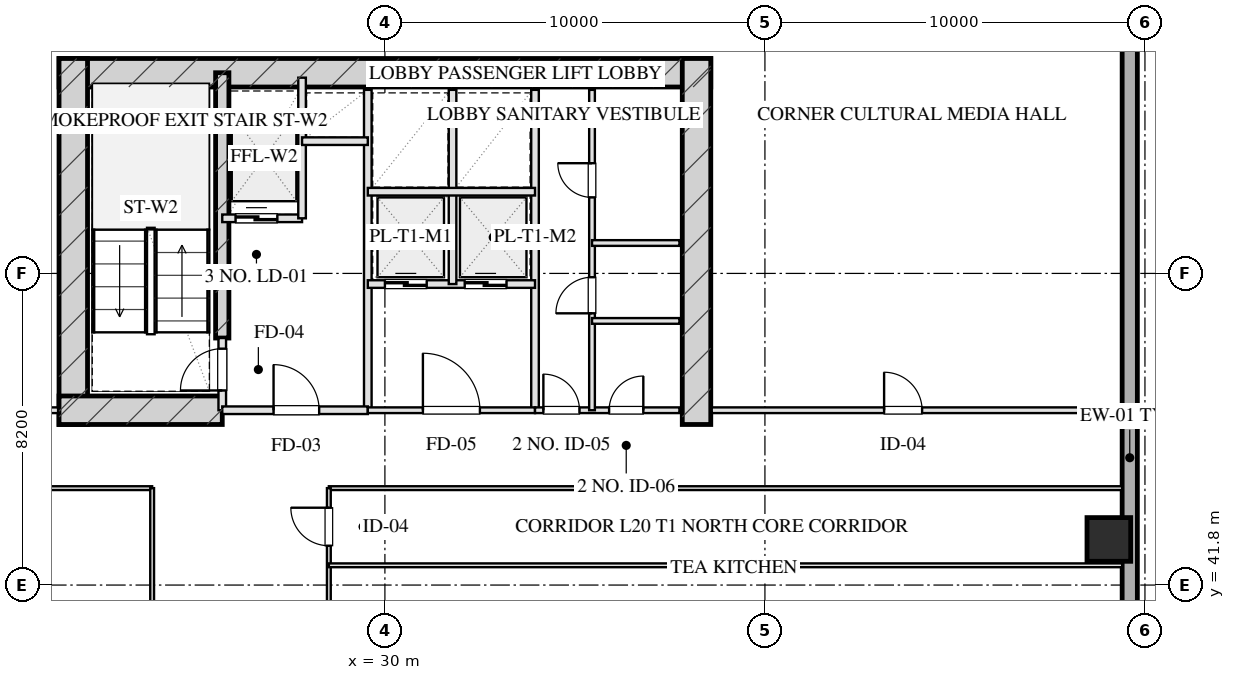
"""IFC4 building model, lengths in metres.
Left out: names, types, materials, properties, quantities, classifications, styles, units other than length and angle.
Written with IfcOpenShell. Run it as: python <this file> out.ifc"""

import sys

from ifc_helpers import new_model, si_unit, direction, frame, frame_2d, origin, origin_2d, place, context, subcontext, project, spatial, rectangle, hollow_rectangle, extrude, element, fill, save


model = new_model("IFC4")
c1 = context("Model", 3, precision=1e-05, world=origin(), true_north=direction((0.0, 1.0)))
c2 = subcontext(c1, "Body", "Model", "MODEL_VIEW")
j1 = project(units=[si_unit("LENGTHUNIT", "METRE"), si_unit("PLANEANGLEUNIT", "RADIAN")], contexts=[c1])
p1 = place(None, origin())
s1 = spatial("IfcSite", under=j1, at=p1, CompositionType="ELEMENT")
p2 = place(p1, origin())
s2 = spatial("IfcBuilding", under=s1, at=p2, CompositionType="ELEMENT")
p3 = place(p2, frame((0.0, 0.0, 81.65)))
s3 = spatial("IfcBuildingStorey", under=s2, at=p3, CompositionType="ELEMENT", Elevation=81.65)
p4 = place(p3, frame((21.425, 55.28, 0.0), z_axis=(0.0, 0.0, 1.0), x_axis=(1.0, 0.0, 0.0)))
e1 = element("IfcWall", 1, at=p4, inside=s3, PredefinedType="SHEAR", context=c2, shape_type="SweptSolid", body=[
    extrude(rectangle(XDim=17.15, YDim=0.75, at=frame_2d((8.575, 0.0))), origin(), (0.0, 0.0, 1.0), 3.45),
])
for number, where, z_axis, x_axis in (
    (2, (21.8, 46.025, 0.0), (0.0, 0.0, 1.0), (0.0, 1.0, 0.0)),
    (3, (38.2, 46.025, 0.0), (0.0, 0.0, 1.0), (0.0, 1.0, 0.0)),
):
    element("IfcWall", number, at=place(p3, frame(where, z_axis=z_axis, x_axis=x_axis)), inside=s3, PredefinedType="SHEAR", context=c2, shape_type="SweptSolid", body=[
        extrude(rectangle(XDim=9.63, YDim=0.75, at=frame_2d((4.815, 0.0))), origin(), (0.0, 0.0, 1.0), 3.45),
    ])
p5 = place(p3, frame((25.72, 48.3, 0.0), z_axis=(0.0, 0.0, 1.0), x_axis=(0.0, 1.0, 0.0)))
e4 = element("IfcWall", 4, at=p5, inside=s3, PredefinedType="SHEAR", context=c2, shape_type="SweptSolid", body=[
    extrude(rectangle(XDim=6.98, YDim=0.35, at=frame_2d((3.49, 0.0))), origin(), (0.0, 0.0, 1.0), 3.45),
])
p6 = place(p3, frame((21.425, 46.4, 0.0), z_axis=(0.0, 0.0, 1.0), x_axis=(1.0, 0.0, 0.0)))
e5 = element("IfcWall", 5, at=p6, inside=s3, PredefinedType="SHEAR", context=c2, shape_type="SweptSolid", body=[
    extrude(rectangle(XDim=4.295, YDim=0.75, at=frame_2d((2.147, 0.0))), origin(), (0.0, 0.0, 1.0), 3.45),
])
p7 = place(p3, frame((49.05, 43.0, 0.0), z_axis=(0.0, 0.0, 1.0), x_axis=(1.0, 0.0, 0.0)))
e6 = element("IfcColumn", 6, at=p7, inside=s3, PredefinedType="COLUMN", context=c2, shape_type="SweptSolid", body=[
    extrude(hollow_rectangle(XDim=1.15, YDim=1.15, WallThickness=0.04, at=origin_2d()), origin(), (0.0, 0.0, 1.0), 3.451),
])
p8 = place(p3, frame((49.6, 60.8, 0.0), z_axis=(0.0, 0.0, 1.0), x_axis=(0.0, -1.0, 0.0)))
e7 = element("IfcWall", 7, at=p8, inside=s3, PredefinedType="SOLIDWALL", context=c2, shape_type="SweptSolid", body=[
    extrude(rectangle(XDim=53.6, YDim=0.4, at=frame_2d((26.8, 0.0))), origin(), (0.0, 0.0, 1.0), 2.61),
])
p9 = place(p8, frame((32.05, 0.0, 0.0)))
e8 = element("IfcOpeningElement", 8, at=p9, cuts=e7, PredefinedType="OPENING", context=c2, shape_type="SweptSolid", body=[
    extrude(rectangle(XDim=1.1, YDim=2.15, at=frame_2d((0.55, 1.075))), frame((0.0, 0.21, 0.0), z_axis=(0.0, -1.0, 0.0), x_axis=(1.0, 0.0, 0.0)), (0.0, 0.0, 1.0), 0.42),
])
p10 = place(p3, frame((25.72, 46.4, 0.0), z_axis=(0.0, 0.0, 1.0), x_axis=(0.0, 1.0, 0.0)))
e9 = element("IfcWall", 9, at=p10, inside=s3, PredefinedType="PARTITIONING", context=c2, shape_type="SweptSolid", body=[
    extrude(rectangle(XDim=1.9, YDim=0.2, at=frame_2d((0.95, 0.0))), origin(), (0.0, 0.0, 1.0), 3.175),
])
p11 = place(p10, frame((0.52, 0.0, 0.0)))
e10 = element("IfcOpeningElement", 10, at=p11, cuts=e9, PredefinedType="OPENING", context=c2, shape_type="SweptSolid", body=[
    extrude(rectangle(XDim=1.1, YDim=2.05, at=frame_2d((0.55, 1.025))), frame((0.0, 0.11, 0.0), z_axis=(0.0, -1.0, 0.0), x_axis=(1.0, 0.0, 0.0)), (0.0, 0.0, 1.0), 0.22),
])
p12 = place(p3, frame((29.55, 46.4, 0.0), z_axis=(0.0, 0.0, 1.0), x_axis=(0.0, 1.0, 0.0)))
e11 = element("IfcWall", 11, at=p12, inside=s3, PredefinedType="PARTITIONING", context=c2, shape_type="SweptSolid", body=[
    extrude(rectangle(XDim=8.43, YDim=0.2, at=frame_2d((4.215, 0.0))), origin(), (0.0, 0.0, 1.0), 3.175),
])
p13 = place(p3, frame((25.72, 46.4, 0.0), z_axis=(0.0, 0.0, 1.0), x_axis=(1.0, 0.0, 0.0)))
e12 = element("IfcWall", 12, at=p13, inside=s3, PredefinedType="PARTITIONING", context=c2, shape_type="SweptSolid", body=[
    extrude(rectangle(XDim=3.83, YDim=0.2, at=frame_2d((1.915, 0.0))), origin(), (0.0, 0.0, 1.0), 3.175),
])
p14 = place(p13, frame((1.35, 0.0, 0.0)))
e13 = element("IfcOpeningElement", 13, at=p14, cuts=e12, PredefinedType="OPENING", context=c2, shape_type="SweptSolid", body=[
    extrude(rectangle(XDim=1.2, YDim=2.05, at=frame_2d((0.6, 1.025))), frame((0.0, 0.11, 0.0), z_axis=(0.0, -1.0, 0.0), x_axis=(1.0, 0.0, 0.0)), (0.0, 0.0, 1.0), 0.22),
])
p15 = place(p3, frame((25.72, 51.45, 0.0), z_axis=(0.0, 0.0, 1.0), x_axis=(1.0, 0.0, 0.0)))
e14 = element("IfcWall", 14, at=p15, inside=s3, PredefinedType="PARTITIONING", context=c2, shape_type="SweptSolid", body=[
    extrude(rectangle(XDim=2.1, YDim=0.2, at=frame_2d((1.05, 0.0))), origin(), (0.0, 0.0, 1.0), 3.175),
])
p16 = place(p15, frame((0.35, 0.0, 0.0)))
e15 = element("IfcOpeningElement", 15, at=p16, cuts=e14, PredefinedType="OPENING", context=c2, shape_type="SweptSolid", body=[
    extrude(rectangle(XDim=1.1, YDim=2.05, at=frame_2d((0.55, 1.025))), frame((0.0, 0.11, 0.0), z_axis=(0.0, -1.0, 0.0), x_axis=(1.0, 0.0, 0.0)), (0.0, 0.0, 1.0), 0.22),
])
p17 = place(p3, frame((27.82, 51.45, 0.0), z_axis=(0.0, 0.0, 1.0), x_axis=(0.0, 1.0, 0.0)))
e16 = element("IfcWall", 16, at=p17, inside=s3, PredefinedType="PARTITIONING", context=c2, shape_type="SweptSolid", body=[
    extrude(rectangle(XDim=3.7, YDim=0.2, at=frame_2d((1.85, 0.0))), origin(), (0.0, 0.0, 1.0), 3.175),
])
p18 = place(p3, frame((27.82, 53.48, 0.0), z_axis=(0.0, 0.0, 1.0), x_axis=(1.0, 0.0, 0.0)))
e17 = element("IfcWall", 17, at=p18, inside=s3, PredefinedType="PARTITIONING", context=c2, shape_type="SweptSolid", body=[
    extrude(rectangle(XDim=1.73, YDim=0.2, at=frame_2d((0.865, 0.0))), origin(), (0.0, 0.0, 1.0), 3.175),
])
p19 = place(p3, frame((33.95, 46.4, 0.0), z_axis=(0.0, 0.0, 1.0), x_axis=(0.0, 1.0, 0.0)))
e18 = element("IfcWall", 18, at=p19, inside=s3, PredefinedType="PARTITIONING", context=c2, shape_type="SweptSolid", body=[
    extrude(rectangle(XDim=8.43, YDim=0.2, at=frame_2d((4.215, 0.0))), origin(), (0.0, 0.0, 1.0), 3.175),
])
p20 = place(p3, frame((29.55, 46.4, 0.0), z_axis=(0.0, 0.0, 1.0), x_axis=(1.0, 0.0, 0.0)))
e19 = element("IfcWall", 19, at=p20, inside=s3, PredefinedType="PARTITIONING", context=c2, shape_type="SweptSolid", body=[
    extrude(rectangle(XDim=4.4, YDim=0.15, at=frame_2d((2.2, 0.0))), origin(), (0.0, 0.0, 1.0), 3.175),
])
p21 = place(p20, frame((1.45, 0.0, 0.0)))
e20 = element("IfcOpeningElement", 20, at=p21, cuts=e19, PredefinedType="OPENING", context=c2, shape_type="SweptSolid", body=[
    extrude(rectangle(XDim=1.5, YDim=2.05, at=frame_2d((0.75, 1.025))), frame((0.0, 0.085, 0.0), z_axis=(0.0, -1.0, 0.0), x_axis=(1.0, 0.0, 0.0)), (0.0, 0.0, 1.0), 0.17),
])
p22 = place(p3, frame((29.55, 49.72, 0.0), z_axis=(0.0, 0.0, 1.0), x_axis=(1.0, 0.0, 0.0)))
e21 = element("IfcWall", 21, at=p22, inside=s3, PredefinedType="PARTITIONING", context=c2, shape_type="SweptSolid", body=[
    extrude(rectangle(XDim=4.4, YDim=0.2, at=frame_2d((2.2, 0.0))), origin(), (0.0, 0.0, 1.0), 3.175),
])
p23 = place(p22, frame((0.45, 0.0, 0.0)))
e22 = element("IfcOpeningElement", 22, at=p23, cuts=e21, PredefinedType="OPENING", context=c2, shape_type="SweptSolid", body=[
    extrude(rectangle(XDim=1.1, YDim=2.05, at=frame_2d((0.55, 1.025))), frame((0.0, 0.11, 0.0), z_axis=(0.0, -1.0, 0.0), x_axis=(1.0, 0.0, 0.0)), (0.0, 0.0, 1.0), 0.22),
])
p24 = place(p22, frame((2.55, 0.0, 0.0)))
e23 = element("IfcOpeningElement", 23, at=p24, cuts=e21, PredefinedType="OPENING", context=c2, shape_type="SweptSolid", body=[
    extrude(rectangle(XDim=1.1, YDim=2.05, at=frame_2d((0.55, 1.025))), frame((0.0, 0.11, 0.0), z_axis=(0.0, -1.0, 0.0), x_axis=(1.0, 0.0, 0.0)), (0.0, 0.0, 1.0), 0.22),
])
p25 = place(p3, frame((31.78, 49.72, 0.0), z_axis=(0.0, 0.0, 1.0), x_axis=(0.0, 1.0, 0.0)))
e24 = element("IfcWall", 24, at=p25, inside=s3, PredefinedType="PARTITIONING", context=c2, shape_type="SweptSolid", body=[
    extrude(rectangle(XDim=5.11, YDim=0.2, at=frame_2d((2.555, 0.0))), origin(), (0.0, 0.0, 1.0), 3.175),
])
p26 = place(p3, frame((29.55, 52.15, 0.0), z_axis=(0.0, 0.0, 1.0), x_axis=(1.0, 0.0, 0.0)))
e25 = element("IfcWall", 25, at=p26, inside=s3, PredefinedType="PARTITIONING", context=c2, shape_type="SweptSolid", body=[
    extrude(rectangle(XDim=4.4, YDim=0.2, at=frame_2d((2.2, 0.0))), origin(), (0.0, 0.0, 1.0), 3.175),
])
p27 = place(p3, frame((33.95, 46.4, 0.0), z_axis=(0.0, 0.0, 1.0), x_axis=(1.0, 0.0, 0.0)))
e26 = element("IfcWall", 26, at=p27, inside=s3, PredefinedType="PARTITIONING", context=c2, shape_type="SweptSolid", body=[
    extrude(rectangle(XDim=3.8, YDim=0.15, at=frame_2d((1.9, 0.0))), origin(), (0.0, 0.0, 1.0), 3.175),
])
p28 = place(p27, frame((0.22, 0.0, 0.0)))
e27 = element("IfcOpeningElement", 27, at=p28, cuts=e26, PredefinedType="OPENING", context=c2, shape_type="SweptSolid", body=[
    extrude(rectangle(XDim=0.95, YDim=2.05, at=frame_2d((0.475, 1.025))), frame((0.0, 0.085, 0.0), z_axis=(0.0, -1.0, 0.0), x_axis=(1.0, 0.0, 0.0)), (0.0, 0.0, 1.0), 0.17),
])
p29 = place(p27, frame((1.95, 0.0, 0.0)))
e28 = element("IfcOpeningElement", 28, at=p29, cuts=e26, PredefinedType="OPENING", context=c2, shape_type="SweptSolid", body=[
    extrude(rectangle(XDim=0.9, YDim=2.05, at=frame_2d((0.45, 1.025))), frame((0.0, 0.085, 0.0), z_axis=(0.0, -1.0, 0.0), x_axis=(1.0, 0.0, 0.0)), (0.0, 0.0, 1.0), 0.17),
])
p30 = place(p3, frame((35.45, 46.4, 0.0), z_axis=(0.0, 0.0, 1.0), x_axis=(0.0, 1.0, 0.0)))
e29 = element("IfcWall", 29, at=p30, inside=s3, PredefinedType="PARTITIONING", context=c2, shape_type="SweptSolid", body=[
    extrude(rectangle(XDim=8.43, YDim=0.15, at=frame_2d((4.215, 0.0))), origin(), (0.0, 0.0, 1.0), 2.765),
])
p31 = place(p30, frame((2.55, 0.0, 0.0)))
e30 = element("IfcOpeningElement", 30, at=p31, cuts=e29, PredefinedType="OPENING", context=c2, shape_type="SweptSolid", body=[
    extrude(rectangle(XDim=0.95, YDim=2.05, at=frame_2d((0.475, 1.025))), frame((0.0, 0.085, 0.0), z_axis=(0.0, -1.0, 0.0), x_axis=(1.0, 0.0, 0.0)), (0.0, 0.0, 1.0), 0.17),
])
p32 = place(p30, frame((5.6, 0.0, 0.0)))
e31 = element("IfcOpeningElement", 31, at=p32, cuts=e29, PredefinedType="OPENING", context=c2, shape_type="SweptSolid", body=[
    extrude(rectangle(XDim=0.9, YDim=2.05, at=frame_2d((0.45, 1.025))), frame((0.0, 0.085, 0.0), z_axis=(0.0, -1.0, 0.0), x_axis=(1.0, 0.0, 0.0)), (0.0, 0.0, 1.0), 0.17),
])
for number, where, z_axis, x_axis in (
    (32, (35.45, 50.8, 0.0), (0.0, 0.0, 1.0), (1.0, 0.0, 0.0)),
    (33, (35.45, 48.75, 0.0), (0.0, 0.0, 1.0), (1.0, 0.0, 0.0)),
):
    element("IfcWall", number, at=place(p3, frame(where, z_axis=z_axis, x_axis=x_axis)), inside=s3, PredefinedType="PARTITIONING", context=c2, shape_type="SweptSolid", body=[
        extrude(rectangle(XDim=2.3, YDim=0.15, at=frame_2d((1.15, 0.0))), origin(), (0.0, 0.0, 1.0), 3.175),
    ])
p33 = place(p3, frame((10.6, 46.4, 0.0), z_axis=(0.0, 0.0, 1.0), x_axis=(1.0, 0.0, 0.0)))
e34 = element("IfcWall", 34, at=p33, inside=s3, PredefinedType="PARTITIONING", context=c2, shape_type="SweptSolid", body=[
    extrude(rectangle(XDim=10.8, YDim=0.15, at=frame_2d((5.4, 0.0))), origin(), (0.0, 0.0, 1.0), 3.175),
])
p34 = place(p33, frame((4.536, 0.0, 0.0)))
e35 = element("IfcOpeningElement", 35, at=p34, cuts=e34, PredefinedType="OPENING", context=c2, shape_type="SweptSolid", body=[
    extrude(rectangle(XDim=1.0, YDim=2.05, at=frame_2d((0.5, 1.025))), frame((0.0, 0.085, 0.0), z_axis=(0.0, -1.0, 0.0), x_axis=(1.0, 0.0, 0.0)), (0.0, 0.0, 1.0), 0.17),
])
p35 = place(p3, frame((38.6, 46.4, 0.0), z_axis=(0.0, 0.0, 1.0), x_axis=(1.0, 0.0, 0.0)))
e36 = element("IfcWall", 36, at=p35, inside=s3, PredefinedType="PARTITIONING", context=c2, shape_type="SweptSolid", body=[
    extrude(rectangle(XDim=10.8, YDim=0.15, at=frame_2d((5.4, 0.0))), origin(), (0.0, 0.0, 1.0), 3.175),
])
p36 = place(p35, frame((4.536, 0.0, 0.0)))
e37 = element("IfcOpeningElement", 37, at=p36, cuts=e36, PredefinedType="OPENING", context=c2, shape_type="SweptSolid", body=[
    extrude(rectangle(XDim=1.0, YDim=2.05, at=frame_2d((0.5, 1.025))), frame((0.0, 0.085, 0.0), z_axis=(0.0, -1.0, 0.0), x_axis=(1.0, 0.0, 0.0)), (0.0, 0.0, 1.0), 0.17),
])
p37 = place(p3, frame((10.6, 44.35, 0.0), z_axis=(0.0, 0.0, 1.0), x_axis=(1.0, 0.0, 0.0)))
e38 = element("IfcWall", 38, at=p37, inside=s3, PredefinedType="MOVABLE", context=c2, shape_type="SweptSolid", body=[
    extrude(rectangle(XDim=13.275, YDim=0.1, at=frame_2d((6.637, 0.0))), origin(), (0.0, 0.0, 1.0), 3.175),
])
p38 = place(p3, frame((28.525, 44.35, 0.0), z_axis=(0.0, 0.0, 1.0), x_axis=(1.0, 0.0, 0.0)))
e39 = element("IfcWall", 39, at=p38, inside=s3, PredefinedType="MOVABLE", context=c2, shape_type="SweptSolid", body=[
    extrude(rectangle(XDim=20.875, YDim=0.1, at=frame_2d((10.438, 0.0))), origin(), (0.0, 0.0, 1.0), 3.175),
])
p39 = place(p3, frame((23.875, 23.65, 0.0), z_axis=(0.0, 0.0, 1.0), x_axis=(0.0, 1.0, 0.0)))
e40 = element("IfcWall", 40, at=p39, inside=s3, PredefinedType="MOVABLE", context=c2, shape_type="SweptSolid", body=[
    extrude(rectangle(XDim=20.7, YDim=0.1, at=frame_2d((10.35, 0.0))), origin(), (0.0, 0.0, 1.0), 3.175),
])
p40 = place(p39, frame((4.075, 0.0, 0.0)))
e41 = element("IfcOpeningElement", 41, at=p40, cuts=e40, PredefinedType="OPENING", context=c2, shape_type="SweptSolid", body=[
    extrude(rectangle(XDim=1.0, YDim=2.05, at=frame_2d((0.5, 1.025))), frame((0.0, 0.06, 0.0), z_axis=(0.0, -1.0, 0.0), x_axis=(1.0, 0.0, 0.0)), (0.0, 0.0, 1.0), 0.12),
])
p41 = place(p39, frame((14.425, 0.0, 0.0)))
e42 = element("IfcOpeningElement", 42, at=p41, cuts=e40, PredefinedType="OPENING", context=c2, shape_type="SweptSolid", body=[
    extrude(rectangle(XDim=1.0, YDim=2.05, at=frame_2d((0.5, 1.025))), frame((0.0, 0.06, 0.0), z_axis=(0.0, -1.0, 0.0), x_axis=(1.0, 0.0, 0.0)), (0.0, 0.0, 1.0), 0.12),
])
p42 = place(p3, frame((28.525, 23.65, 0.0), z_axis=(0.0, 0.0, 1.0), x_axis=(0.0, 1.0, 0.0)))
e43 = element("IfcWall", 43, at=p42, inside=s3, PredefinedType="MOVABLE", context=c2, shape_type="SweptSolid", body=[
    extrude(rectangle(XDim=20.7, YDim=0.1, at=frame_2d((10.35, 0.0))), origin(), (0.0, 0.0, 1.0), 3.175),
])
p43 = place(p42, frame((0.775, 0.0, 0.0)))
e44 = element("IfcOpeningElement", 44, at=p43, cuts=e43, PredefinedType="OPENING", context=c2, shape_type="SweptSolid", body=[
    extrude(rectangle(XDim=1.0, YDim=2.05, at=frame_2d((0.5, 1.025))), frame((0.0, 0.06, 0.0), z_axis=(0.0, -1.0, 0.0), x_axis=(1.0, 0.0, 0.0)), (0.0, 0.0, 1.0), 0.12),
])
p44 = place(p42, frame((3.95, 0.0, 0.0)))
e45 = element("IfcOpeningElement", 45, at=p44, cuts=e43, PredefinedType="OPENING", context=c2, shape_type="SweptSolid", body=[
    extrude(rectangle(XDim=1.0, YDim=2.05, at=frame_2d((0.5, 1.025))), frame((0.0, 0.06, 0.0), z_axis=(0.0, -1.0, 0.0), x_axis=(1.0, 0.0, 0.0)), (0.0, 0.0, 1.0), 0.12),
])
p45 = place(p42, frame((7.51, 0.0, 0.0)))
e46 = element("IfcOpeningElement", 46, at=p45, cuts=e43, PredefinedType="OPENING", context=c2, shape_type="SweptSolid", body=[
    extrude(rectangle(XDim=1.05, YDim=2.05, at=frame_2d((0.525, 1.025))), frame((0.0, 0.06, 0.0), z_axis=(0.0, -1.0, 0.0), x_axis=(1.0, 0.0, 0.0)), (0.0, 0.0, 1.0), 0.12),
])
p46 = place(p42, frame((11.51, 0.0, 0.0)))
e47 = element("IfcOpeningElement", 47, at=p46, cuts=e43, PredefinedType="OPENING", context=c2, shape_type="SweptSolid", body=[
    extrude(rectangle(XDim=1.0, YDim=2.05, at=frame_2d((0.5, 1.025))), frame((0.0, 0.06, 0.0), z_axis=(0.0, -1.0, 0.0), x_axis=(1.0, 0.0, 0.0)), (0.0, 0.0, 1.0), 0.12),
])
p47 = place(p42, frame((15.75, 0.0, 0.0)))
e48 = element("IfcOpeningElement", 48, at=p47, cuts=e43, PredefinedType="OPENING", context=c2, shape_type="SweptSolid", body=[
    extrude(rectangle(XDim=1.0, YDim=2.05, at=frame_2d((0.5, 1.025))), frame((0.0, 0.06, 0.0), z_axis=(0.0, -1.0, 0.0), x_axis=(1.0, 0.0, 0.0)), (0.0, 0.0, 1.0), 0.12),
])
p48 = place(p42, frame((19.185, 0.0, 0.0)))
e49 = element("IfcOpeningElement", 49, at=p48, cuts=e43, PredefinedType="OPENING", context=c2, shape_type="SweptSolid", body=[
    extrude(rectangle(XDim=1.0, YDim=2.05, at=frame_2d((0.5, 1.025))), frame((0.0, 0.06, 0.0), z_axis=(0.0, -1.0, 0.0), x_axis=(1.0, 0.0, 0.0)), (0.0, 0.0, 1.0), 0.12),
])
p49 = place(p3, frame((28.525, 42.32, 0.0), z_axis=(0.0, 0.0, 1.0), x_axis=(1.0, 0.0, 0.0)))
e50 = element("IfcWall", 50, at=p49, inside=s3, PredefinedType="MOVABLE", context=c2, shape_type="SweptSolid", body=[
    extrude(rectangle(XDim=20.875, YDim=0.1, at=frame_2d((10.438, 0.0))), origin(), (0.0, 0.0, 1.0), 3.175),
])
p50 = place(p11, origin())
e51 = element("IfcDoor", 51, at=p50, inside=s3, OperationType="SINGLE_SWING_LEFT", PredefinedType="DOOR", context=c2, shape_type="SweptSolid", body=[
    extrude(rectangle(XDim=1.1, YDim=2.05, at=frame_2d((0.55, 1.025))), frame((0.0, 0.025, 0.0), z_axis=(0.0, -1.0, 0.0), x_axis=(1.0, 0.0, 0.0)), (0.0, 0.0, 1.0), 0.05),
])
fill(e10, e51)
p51 = place(p14, origin())
e52 = element("IfcDoor", 52, at=p51, inside=s3, OperationType="SINGLE_SWING_LEFT", PredefinedType="DOOR", context=c2, shape_type="SweptSolid", body=[
    extrude(rectangle(XDim=1.2, YDim=2.05, at=frame_2d((0.6, 1.025))), frame((0.0, 0.025, 0.0), z_axis=(0.0, -1.0, 0.0), x_axis=(1.0, 0.0, 0.0)), (0.0, 0.0, 1.0), 0.05),
])
fill(e13, e52)
p52 = place(p16, origin())
e53 = element("IfcDoor", 53, at=p52, inside=s3, OperationType="DOUBLE_DOOR_SLIDING", PredefinedType="DOOR", context=c2, shape_type="SweptSolid", body=[
    extrude(rectangle(XDim=1.1, YDim=2.05, at=frame_2d((0.55, 1.025))), frame((0.0, 0.025, 0.0), z_axis=(0.0, -1.0, 0.0), x_axis=(1.0, 0.0, 0.0)), (0.0, 0.0, 1.0), 0.05),
])
fill(e15, e53)
p53 = place(p21, origin())
e54 = element("IfcDoor", 54, at=p53, inside=s3, OperationType="SINGLE_SWING_LEFT", PredefinedType="DOOR", context=c2, shape_type="SweptSolid", body=[
    extrude(rectangle(XDim=1.5, YDim=2.05, at=frame_2d((0.75, 1.025))), frame((0.0, 0.025, 0.0), z_axis=(0.0, -1.0, 0.0), x_axis=(1.0, 0.0, 0.0)), (0.0, 0.0, 1.0), 0.05),
])
fill(e20, e54)
p54 = place(p23, origin())
e55 = element("IfcDoor", 55, at=p54, inside=s3, OperationType="DOUBLE_DOOR_SLIDING", PredefinedType="DOOR", context=c2, shape_type="SweptSolid", body=[
    extrude(rectangle(XDim=1.1, YDim=2.05, at=frame_2d((0.55, 1.025))), frame((0.0, 0.025, 0.0), z_axis=(0.0, -1.0, 0.0), x_axis=(1.0, 0.0, 0.0)), (0.0, 0.0, 1.0), 0.05),
])
fill(e22, e55)
p55 = place(p24, origin())
e56 = element("IfcDoor", 56, at=p55, inside=s3, OperationType="DOUBLE_DOOR_SLIDING", PredefinedType="DOOR", context=c2, shape_type="SweptSolid", body=[
    extrude(rectangle(XDim=1.1, YDim=2.05, at=frame_2d((0.55, 1.025))), frame((0.0, 0.025, 0.0), z_axis=(0.0, -1.0, 0.0), x_axis=(1.0, 0.0, 0.0)), (0.0, 0.0, 1.0), 0.05),
])
fill(e23, e56)
p56 = place(p28, origin())
e57 = element("IfcDoor", 57, at=p56, inside=s3, OperationType="SINGLE_SWING_LEFT", PredefinedType="DOOR", context=c2, shape_type="SweptSolid", body=[
    extrude(rectangle(XDim=0.95, YDim=2.05, at=frame_2d((0.475, 1.025))), frame((0.0, 0.025, 0.0), z_axis=(0.0, -1.0, 0.0), x_axis=(1.0, 0.0, 0.0)), (0.0, 0.0, 1.0), 0.05),
])
fill(e27, e57)
p57 = place(p29, origin())
e58 = element("IfcDoor", 58, at=p57, inside=s3, OperationType="SINGLE_SWING_RIGHT", PredefinedType="DOOR", context=c2, shape_type="SweptSolid", body=[
    extrude(rectangle(XDim=0.9, YDim=2.05, at=frame_2d((0.45, 1.025))), frame((0.0, 0.025, 0.0), z_axis=(0.0, -1.0, 0.0), x_axis=(1.0, 0.0, 0.0)), (0.0, 0.0, 1.0), 0.05),
])
fill(e28, e58)
p58 = place(p31, origin())
e59 = element("IfcDoor", 59, at=p58, inside=s3, OperationType="SINGLE_SWING_LEFT", PredefinedType="DOOR", context=c2, shape_type="SweptSolid", body=[
    extrude(rectangle(XDim=0.95, YDim=2.05, at=frame_2d((0.475, 1.025))), frame((0.0, 0.025, 0.0), z_axis=(0.0, -1.0, 0.0), x_axis=(1.0, 0.0, 0.0)), (0.0, 0.0, 1.0), 0.05),
])
fill(e30, e59)
p59 = place(p32, origin())
e60 = element("IfcDoor", 60, at=p59, inside=s3, OperationType="SINGLE_SWING_RIGHT", PredefinedType="DOOR", context=c2, shape_type="SweptSolid", body=[
    extrude(rectangle(XDim=0.9, YDim=2.05, at=frame_2d((0.45, 1.025))), frame((0.0, 0.025, 0.0), z_axis=(0.0, -1.0, 0.0), x_axis=(1.0, 0.0, 0.0)), (0.0, 0.0, 1.0), 0.05),
])
fill(e31, e60)
p60 = place(p36, origin())
e61 = element("IfcDoor", 61, at=p60, inside=s3, OperationType="SINGLE_SWING_LEFT", PredefinedType="DOOR", context=c2, shape_type="SweptSolid", body=[
    extrude(rectangle(XDim=1.0, YDim=2.05, at=frame_2d((0.5, 1.025))), frame((0.0, 0.025, 0.0), z_axis=(0.0, -1.0, 0.0), x_axis=(1.0, 0.0, 0.0)), (0.0, 0.0, 1.0), 0.05),
])
fill(e37, e61)
p61 = place(p48, origin())
e62 = element("IfcDoor", 62, at=p61, inside=s3, OperationType="SINGLE_SWING_RIGHT", PredefinedType="DOOR", context=c2, shape_type="SweptSolid", body=[
    extrude(rectangle(XDim=1.0, YDim=2.05, at=frame_2d((0.5, 1.025))), frame((0.0, 0.025, 0.0), z_axis=(0.0, -1.0, 0.0), x_axis=(1.0, 0.0, 0.0)), (0.0, 0.0, 1.0), 0.05),
])
fill(e49, e62)
save(model, sys.argv[1])
